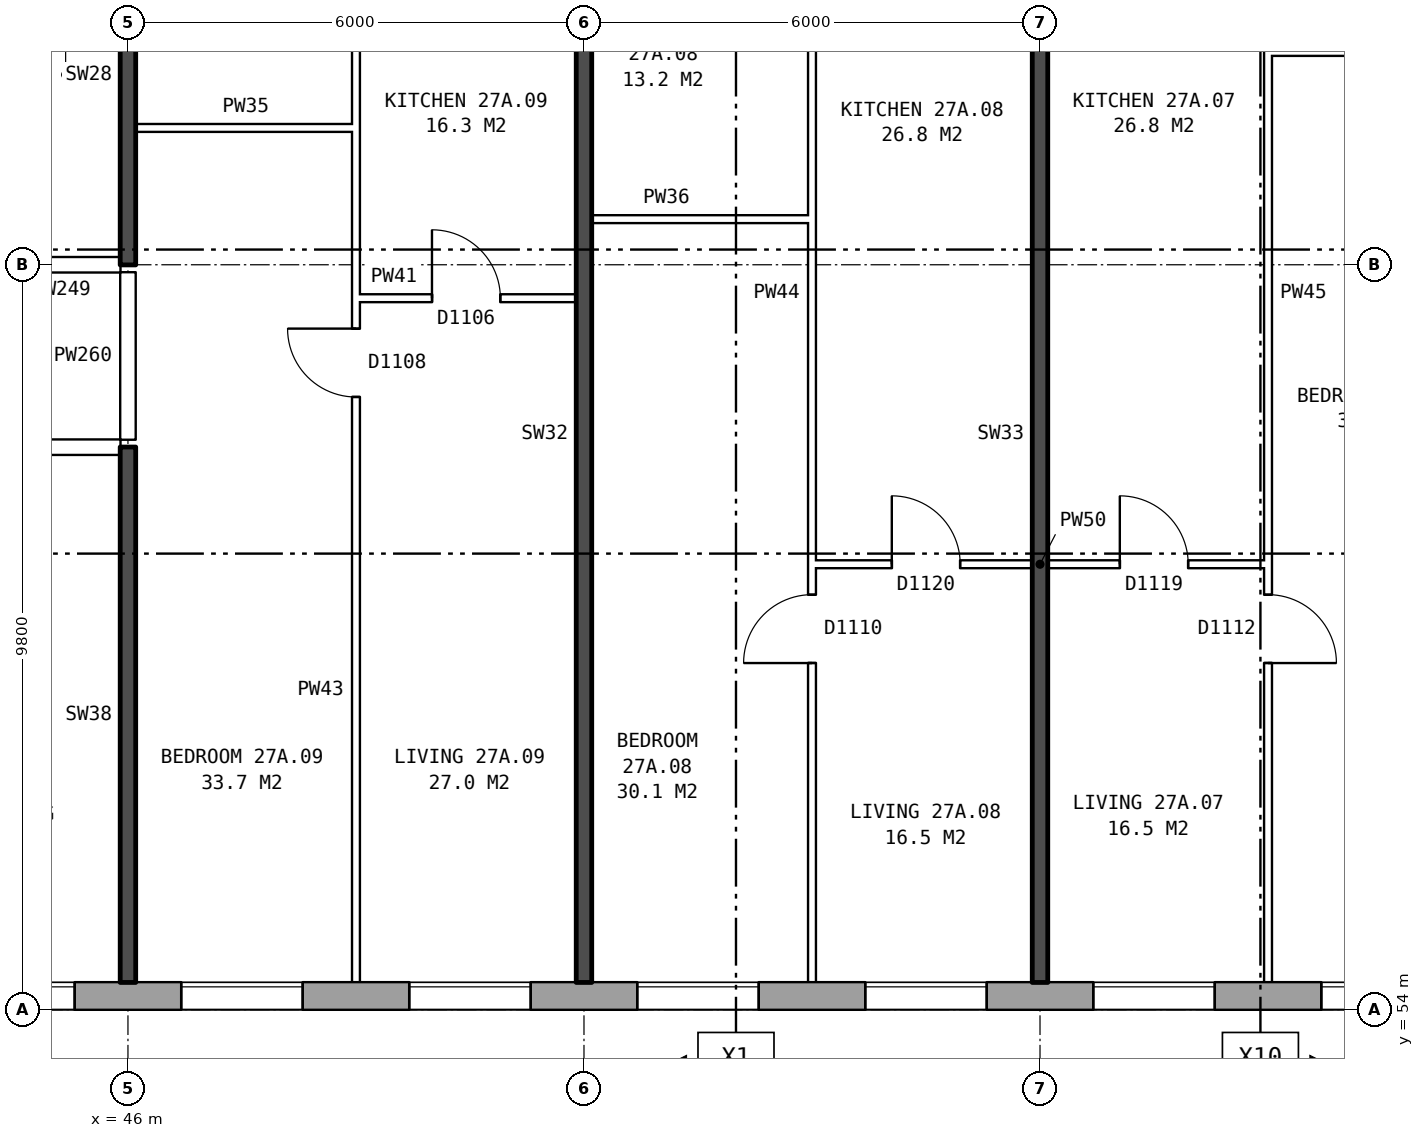
"""IFC4 building model, lengths in metres.
Left out: names, types, materials, properties, quantities, classifications, styles, units other than length and angle.
Written with IfcOpenShell. Run it as: python <this file> out.ifc"""

import sys

from ifc_helpers import new_model, si_unit, direction, frame, frame_2d, origin, place, context, subcontext, project, spatial, rectangle, extrude, element, fill, save


model = new_model("IFC4")
c1 = context("Model", 3, precision=1e-05, world=origin(), true_north=direction((0.0, 1.0)))
c2 = subcontext(c1, "Body", "Model", "MODEL_VIEW")
j1 = project(units=[si_unit("LENGTHUNIT", "METRE"), si_unit("PLANEANGLEUNIT", "RADIAN")], contexts=[c1])
p1 = place(None, origin())
s1 = spatial("IfcSite", under=j1, at=p1, CompositionType="ELEMENT")
p2 = place(p1, origin())
s2 = spatial("IfcBuilding", under=s1, at=p2, CompositionType="ELEMENT")
p3 = place(p2, frame((0.0, 0.0, 99.5)))
s3 = spatial("IfcBuildingStorey", under=s2, at=p3, CompositionType="ELEMENT", Elevation=99.5)
p4 = place(p3, frame((28.075, 54.18, 0.0), z_axis=(0.0, 0.0, 1.0), x_axis=(1.0, 0.0, 0.0)))
e1 = element("IfcWall", 1, at=p4, inside=s3, PredefinedType="STANDARD", context=c2, shape_type="SweptSolid", body=[
    extrude(rectangle(XDim=44.851, YDim=0.36, at=frame_2d((22.425, 0.0))), origin(), (0.0, 0.0, 1.0), 2.85),
])
p5 = place(p4, frame((0.625, 0.0, 0.8)))
e2 = element("IfcOpeningElement", 2, at=p5, cuts=e1, PredefinedType="OPENING", context=c2, shape_type="SweptSolid", body=[
    extrude(rectangle(XDim=1.6, YDim=1.8, at=frame_2d((0.8, 0.9))), frame((0.0, 0.19, 0.0), z_axis=(0.0, -1.0, 0.0), x_axis=(1.0, 0.0, 0.0)), (0.0, 0.0, 1.0), 0.38),
])
p6 = place(p4, frame((2.55, 0.0, 1.7)))
e3 = element("IfcOpeningElement", 3, at=p6, cuts=e1, PredefinedType="OPENING", context=c2, shape_type="SweptSolid", body=[
    extrude(rectangle(XDim=0.8, YDim=0.9, at=frame_2d((0.4, 0.45))), frame((0.0, 0.19, 0.0), z_axis=(0.0, -1.0, 0.0), x_axis=(1.0, 0.0, 0.0)), (0.0, 0.0, 1.0), 0.38),
])
p7 = place(p4, frame((6.625, 0.0, 0.8)))
e4 = element("IfcOpeningElement", 4, at=p7, cuts=e1, PredefinedType="OPENING", context=c2, shape_type="SweptSolid", body=[
    extrude(rectangle(XDim=1.6, YDim=1.8, at=frame_2d((0.8, 0.9))), frame((0.0, 0.19, 0.0), z_axis=(0.0, -1.0, 0.0), x_axis=(1.0, 0.0, 0.0)), (0.0, 0.0, 1.0), 0.38),
])
p8 = place(p4, frame((9.625, 0.0, 0.8)))
e5 = element("IfcOpeningElement", 5, at=p8, cuts=e1, PredefinedType="OPENING", context=c2, shape_type="SweptSolid", body=[
    extrude(rectangle(XDim=1.6, YDim=1.8, at=frame_2d((0.8, 0.9))), frame((0.0, 0.19, 0.0), z_axis=(0.0, -1.0, 0.0), x_axis=(1.0, 0.0, 0.0)), (0.0, 0.0, 1.0), 0.38),
])
p9 = place(p4, frame((12.625, 0.0, 0.8)))
e6 = element("IfcOpeningElement", 6, at=p9, cuts=e1, PredefinedType="OPENING", context=c2, shape_type="SweptSolid", body=[
    extrude(rectangle(XDim=1.6, YDim=1.8, at=frame_2d((0.8, 0.9))), frame((0.0, 0.19, 0.0), z_axis=(0.0, -1.0, 0.0), x_axis=(1.0, 0.0, 0.0)), (0.0, 0.0, 1.0), 0.38),
])
p10 = place(p4, frame((15.625, 0.0, 0.8)))
e7 = element("IfcOpeningElement", 7, at=p10, cuts=e1, PredefinedType="OPENING", context=c2, shape_type="SweptSolid", body=[
    extrude(rectangle(XDim=1.6, YDim=1.8, at=frame_2d((0.8, 0.9))), frame((0.0, 0.19, 0.0), z_axis=(0.0, -1.0, 0.0), x_axis=(1.0, 0.0, 0.0)), (0.0, 0.0, 1.0), 0.38),
])
p11 = place(p4, frame((18.625, 0.0, 0.8)))
e8 = element("IfcOpeningElement", 8, at=p11, cuts=e1, PredefinedType="OPENING", context=c2, shape_type="SweptSolid", body=[
    extrude(rectangle(XDim=1.6, YDim=1.8, at=frame_2d((0.8, 0.9))), frame((0.0, 0.19, 0.0), z_axis=(0.0, -1.0, 0.0), x_axis=(1.0, 0.0, 0.0)), (0.0, 0.0, 1.0), 0.38),
])
p12 = place(p4, frame((21.625, 0.0, 0.8)))
e9 = element("IfcOpeningElement", 9, at=p12, cuts=e1, PredefinedType="OPENING", context=c2, shape_type="SweptSolid", body=[
    extrude(rectangle(XDim=1.6, YDim=1.8, at=frame_2d((0.8, 0.9))), frame((0.0, 0.19, 0.0), z_axis=(0.0, -1.0, 0.0), x_axis=(1.0, 0.0, 0.0)), (0.0, 0.0, 1.0), 0.38),
])
p13 = place(p4, frame((24.625, 0.0, 0.8)))
e10 = element("IfcOpeningElement", 10, at=p13, cuts=e1, PredefinedType="OPENING", context=c2, shape_type="SweptSolid", body=[
    extrude(rectangle(XDim=1.6, YDim=1.8, at=frame_2d((0.8, 0.9))), frame((0.0, 0.19, 0.0), z_axis=(0.0, -1.0, 0.0), x_axis=(1.0, 0.0, 0.0)), (0.0, 0.0, 1.0), 0.38),
])
p14 = place(p4, frame((27.625, 0.0, 0.8)))
e11 = element("IfcOpeningElement", 11, at=p14, cuts=e1, PredefinedType="OPENING", context=c2, shape_type="SweptSolid", body=[
    extrude(rectangle(XDim=1.6, YDim=1.8, at=frame_2d((0.8, 0.9))), frame((0.0, 0.19, 0.0), z_axis=(0.0, -1.0, 0.0), x_axis=(1.0, 0.0, 0.0)), (0.0, 0.0, 1.0), 0.38),
])
p15 = place(p4, frame((30.625, 0.0, 0.8)))
e12 = element("IfcOpeningElement", 12, at=p15, cuts=e1, PredefinedType="OPENING", context=c2, shape_type="SweptSolid", body=[
    extrude(rectangle(XDim=1.6, YDim=1.8, at=frame_2d((0.8, 0.9))), frame((0.0, 0.19, 0.0), z_axis=(0.0, -1.0, 0.0), x_axis=(1.0, 0.0, 0.0)), (0.0, 0.0, 1.0), 0.38),
])
p16 = place(p4, frame((33.625, 0.0, 0.8)))
e13 = element("IfcOpeningElement", 13, at=p16, cuts=e1, PredefinedType="OPENING", context=c2, shape_type="SweptSolid", body=[
    extrude(rectangle(XDim=1.6, YDim=1.8, at=frame_2d((0.8, 0.9))), frame((0.0, 0.19, 0.0), z_axis=(0.0, -1.0, 0.0), x_axis=(1.0, 0.0, 0.0)), (0.0, 0.0, 1.0), 0.38),
])
p17 = place(p4, frame((36.625, 0.0, 0.8)))
e14 = element("IfcOpeningElement", 14, at=p17, cuts=e1, PredefinedType="OPENING", context=c2, shape_type="SweptSolid", body=[
    extrude(rectangle(XDim=1.6, YDim=1.8, at=frame_2d((0.8, 0.9))), frame((0.0, 0.19, 0.0), z_axis=(0.0, -1.0, 0.0), x_axis=(1.0, 0.0, 0.0)), (0.0, 0.0, 1.0), 0.38),
])
p18 = place(p4, frame((38.525, 0.0, 0.8)))
e15 = element("IfcOpeningElement", 15, at=p18, cuts=e1, PredefinedType="OPENING", context=c2, shape_type="SweptSolid", body=[
    extrude(rectangle(XDim=1.2, YDim=1.2, at=frame_2d((0.6, 0.6))), frame((0.0, 0.19, 0.0), z_axis=(0.0, -1.0, 0.0), x_axis=(1.0, 0.0, 0.0)), (0.0, 0.0, 1.0), 0.38),
])
p19 = place(p4, frame((42.625, 0.0, 0.8)))
e16 = element("IfcOpeningElement", 16, at=p19, cuts=e1, PredefinedType="OPENING", context=c2, shape_type="SweptSolid", body=[
    extrude(rectangle(XDim=1.6, YDim=1.8, at=frame_2d((0.8, 0.9))), frame((0.0, 0.19, 0.0), z_axis=(0.0, -1.0, 0.0), x_axis=(1.0, 0.0, 0.0)), (0.0, 0.0, 1.0), 0.38),
])
p20 = place(p4, frame((4.65, 0.0, 0.8)))
e17 = element("IfcOpeningElement", 17, at=p20, cuts=e1, PredefinedType="OPENING", context=c2, shape_type="SweptSolid", body=[
    extrude(rectangle(XDim=1.0, YDim=0.9, at=frame_2d((0.5, 0.45))), frame((0.0, 0.19, 0.0), z_axis=(0.0, -1.0, 0.0), x_axis=(1.0, 0.0, 0.0)), (0.0, 0.0, 1.0), 0.38),
])
p21 = place(p3, frame((55.0, 59.86, 0.0), z_axis=(0.0, 0.0, 1.0), x_axis=(1.0, 0.0, 0.0)))
e18 = element("IfcWall", 18, at=p21, inside=s3, PredefinedType="PARTITIONING", context=c2, shape_type="SweptSolid", body=[
    extrude(rectangle(XDim=6.0, YDim=0.1, at=frame_2d((3.0, 0.0))), origin(), (0.0, 0.0, 1.0), 2.85),
])
p22 = place(p21, frame((4.05, 0.0, 0.0)))
e19 = element("IfcOpeningElement", 19, at=p22, cuts=e18, PredefinedType="OPENING", context=c2, shape_type="SweptSolid", body=[
    extrude(rectangle(XDim=0.9, YDim=2.1, at=frame_2d((0.45, 1.05))), frame((0.0, 0.06, 0.0), z_axis=(0.0, -1.0, 0.0), x_axis=(1.0, 0.0, 0.0)), (0.0, 0.0, 1.0), 0.12),
])
p23 = place(p21, frame((1.05, 0.0, 0.0)))
e20 = element("IfcOpeningElement", 20, at=p23, cuts=e18, PredefinedType="OPENING", context=c2, shape_type="SweptSolid", body=[
    extrude(rectangle(XDim=0.9, YDim=2.1, at=frame_2d((0.45, 1.05))), frame((0.0, 0.06, 0.0), z_axis=(0.0, -1.0, 0.0), x_axis=(1.0, 0.0, 0.0)), (0.0, 0.0, 1.0), 0.12),
])
p24 = place(p3, frame((25.36, 61.4, 0.0), z_axis=(0.0, 0.0, 1.0), x_axis=(1.0, 0.0, 0.0)))
e21 = element("IfcWall", 21, at=p24, inside=s3, PredefinedType="PARTITIONING", context=c2, shape_type="SweptSolid", body=[
    extrude(rectangle(XDim=20.54, YDim=0.2, at=frame_2d((10.27, 0.0))), origin(), (0.0, 0.0, 1.0), 2.85),
])
p25 = place(p24, frame((18.09, 0.0, 0.0)))
e22 = element("IfcOpeningElement", 22, at=p25, cuts=e21, PredefinedType="OPENING", context=c2, shape_type="SweptSolid", body=[
    extrude(rectangle(XDim=1.0, YDim=2.1, at=frame_2d((0.5, 1.05))), frame((0.0, 0.11, 0.0), z_axis=(0.0, -1.0, 0.0), x_axis=(1.0, 0.0, 0.0)), (0.0, 0.0, 1.0), 0.22),
])
p26 = place(p24, frame((12.14, 0.0, 0.0)))
e23 = element("IfcOpeningElement", 23, at=p26, cuts=e21, PredefinedType="OPENING", context=c2, shape_type="SweptSolid", body=[
    extrude(rectangle(XDim=1.0, YDim=2.1, at=frame_2d((0.5, 1.05))), frame((0.0, 0.11, 0.0), z_axis=(0.0, -1.0, 0.0), x_axis=(1.0, 0.0, 0.0)), (0.0, 0.0, 1.0), 0.22),
])
p27 = place(p24, frame((2.62, 0.0, 0.0)))
e24 = element("IfcOpeningElement", 24, at=p27, cuts=e21, PredefinedType="OPENING", context=c2, shape_type="SweptSolid", body=[
    extrude(rectangle(XDim=1.0, YDim=2.1, at=frame_2d((0.5, 1.05))), frame((0.0, 0.11, 0.0), z_axis=(0.0, -1.0, 0.0), x_axis=(1.0, 0.0, 0.0)), (0.0, 0.0, 1.0), 0.22),
])
p28 = place(p3, frame((49.0, 63.36, 0.0), z_axis=(0.0, 0.0, 1.0), x_axis=(1.0, 0.0, 0.0)))
e25 = element("IfcWall", 25, at=p28, inside=s3, PredefinedType="PARTITIONING", context=c2, shape_type="SweptSolid", body=[
    extrude(rectangle(XDim=2.9, YDim=0.1, at=frame_2d((1.45, 0.0))), origin(), (0.0, 0.0, 1.0), 2.85),
])
p29 = place(p28, frame((1.0, 0.0, 0.0)))
e26 = element("IfcOpeningElement", 26, at=p29, cuts=e25, PredefinedType="OPENING", context=c2, shape_type="SweptSolid", body=[
    extrude(rectangle(XDim=0.9, YDim=2.1, at=frame_2d((0.45, 1.05))), frame((0.0, 0.06, 0.0), z_axis=(0.0, -1.0, 0.0), x_axis=(1.0, 0.0, 0.0)), (0.0, 0.0, 1.0), 0.12),
])
p30 = place(p3, frame((44.36, 63.8, 0.0), z_axis=(0.0, 0.0, 1.0), x_axis=(1.0, 0.0, 0.0)))
e27 = element("IfcWall", 27, at=p30, inside=s3, PredefinedType="PARTITIONING", context=c2, shape_type="SweptSolid", body=[
    extrude(rectangle(XDim=1.54, YDim=0.2, at=frame_2d((0.77, 0.0))), origin(), (0.0, 0.0, 1.0), 2.85),
])
for number, where, z_axis, x_axis in (
    (28, (52.1, 64.4, 0.0), (0.0, 0.0, 1.0), (1.0, 0.0, 0.0)),
    (29, (46.1, 65.6, 0.0), (0.0, 0.0, 1.0), (1.0, 0.0, 0.0)),
):
    element("IfcWall", number, at=place(p3, frame(where, z_axis=z_axis, x_axis=x_axis)), inside=s3, PredefinedType="PARTITIONING", context=c2, shape_type="SweptSolid", body=[
        extrude(rectangle(XDim=2.9, YDim=0.1, at=frame_2d((1.45, 0.0))), origin(), (0.0, 0.0, 1.0), 2.85),
    ])
p31 = place(p3, frame((61.0, 66.6, 0.0), z_axis=(0.0, 0.0, 1.0), x_axis=(1.0, 0.0, 0.0)))
e30 = element("IfcWall", 30, at=p31, inside=s3, PredefinedType="PARTITIONING", context=c2, shape_type="SweptSolid", body=[
    extrude(rectangle(XDim=2.64, YDim=0.1, at=frame_2d((1.32, 0.0))), origin(), (0.0, 0.0, 1.0), 2.85),
])
p32 = place(p3, frame((46.0, 54.36, 0.0), z_axis=(0.0, 0.0, 1.0), x_axis=(0.0, 1.0, 0.0)))
e31 = element("IfcWall", 31, at=p32, inside=s3, PredefinedType="SOLIDWALL", context=c2, shape_type="SweptSolid", body=[
    extrude(rectangle(XDim=7.04, YDim=0.2, at=frame_2d((3.52, 0.0))), origin(), (0.0, 0.0, 1.0), 2.85),
])
p33 = place(p3, frame((46.0, 61.5, 0.0), z_axis=(0.0, 0.0, 1.0), x_axis=(0.0, 1.0, 0.0)))
e32 = element("IfcWall", 32, at=p33, inside=s3, PredefinedType="PARTITIONING", context=c2, shape_type="SweptSolid", body=[
    extrude(rectangle(XDim=2.2, YDim=0.2, at=frame_2d((1.1, 0.0))), origin(), (0.0, 0.0, 1.0), 2.85),
])
p34 = place(p3, frame((46.0, 63.8, 0.0), z_axis=(0.0, 0.0, 1.0), x_axis=(0.0, 1.0, 0.0)))
e33 = element("IfcWall", 33, at=p34, inside=s3, PredefinedType="SOLIDWALL", context=c2, shape_type="SweptSolid", body=[
    extrude(rectangle(XDim=5.0, YDim=0.2, at=frame_2d((2.5, 0.0))), origin(), (0.0, 0.0, 1.0), 2.85),
])
p35 = place(p3, frame((49.0, 54.36, 0.0), z_axis=(0.0, 0.0, 1.0), x_axis=(0.0, 1.0, 0.0)))
e34 = element("IfcWall", 34, at=p35, inside=s3, PredefinedType="PARTITIONING", context=c2, shape_type="SweptSolid", body=[
    extrude(rectangle(XDim=14.34, YDim=0.1, at=frame_2d((7.17, 0.0))), origin(), (0.0, 0.0, 1.0), 2.85),
])
p36 = place(p35, frame((7.7, 0.0, 0.0)))
e35 = element("IfcOpeningElement", 35, at=p36, cuts=e34, PredefinedType="OPENING", context=c2, shape_type="SweptSolid", body=[
    extrude(rectangle(XDim=0.9, YDim=2.1, at=frame_2d((0.45, 1.05))), frame((0.0, 0.06, 0.0), z_axis=(0.0, -1.0, 0.0), x_axis=(1.0, 0.0, 0.0)), (0.0, 0.0, 1.0), 0.12),
])
p37 = place(p35, frame((13.04, 0.0, 0.0)))
e36 = element("IfcOpeningElement", 36, at=p37, cuts=e34, PredefinedType="OPENING", context=c2, shape_type="SweptSolid", body=[
    extrude(rectangle(XDim=0.9, YDim=2.1, at=frame_2d((0.45, 1.05))), frame((0.0, 0.06, 0.0), z_axis=(0.0, -1.0, 0.0), x_axis=(1.0, 0.0, 0.0)), (0.0, 0.0, 1.0), 0.12),
])
p38 = place(p3, frame((52.0, 54.36, 0.0), z_axis=(0.0, 0.0, 1.0), x_axis=(0.0, 1.0, 0.0)))
e37 = element("IfcWall", 37, at=p38, inside=s3, PredefinedType="SOLIDWALL", context=c2, shape_type="SweptSolid", body=[
    extrude(rectangle(XDim=14.44, YDim=0.2, at=frame_2d((7.22, 0.0))), origin(), (0.0, 0.0, 1.0), 2.85),
])
p39 = place(p3, frame((55.0, 54.36, 0.0), z_axis=(0.0, 0.0, 1.0), x_axis=(0.0, 1.0, 0.0)))
e38 = element("IfcWall", 38, at=p39, inside=s3, PredefinedType="PARTITIONING", context=c2, shape_type="SweptSolid", body=[
    extrude(rectangle(XDim=14.34, YDim=0.1, at=frame_2d((7.17, 0.0))), origin(), (0.0, 0.0, 1.0), 2.85),
])
p40 = place(p39, frame((4.2, 0.0, 0.0)))
e39 = element("IfcOpeningElement", 39, at=p40, cuts=e38, PredefinedType="OPENING", context=c2, shape_type="SweptSolid", body=[
    extrude(rectangle(XDim=0.9, YDim=2.1, at=frame_2d((0.45, 1.05))), frame((0.0, 0.06, 0.0), z_axis=(0.0, -1.0, 0.0), x_axis=(1.0, 0.0, 0.0)), (0.0, 0.0, 1.0), 0.12),
])
p41 = place(p39, frame((13.04, 0.0, 0.0)))
e40 = element("IfcOpeningElement", 40, at=p41, cuts=e38, PredefinedType="OPENING", context=c2, shape_type="SweptSolid", body=[
    extrude(rectangle(XDim=0.9, YDim=2.1, at=frame_2d((0.45, 1.05))), frame((0.0, 0.06, 0.0), z_axis=(0.0, -1.0, 0.0), x_axis=(1.0, 0.0, 0.0)), (0.0, 0.0, 1.0), 0.12),
])
p42 = place(p3, frame((58.0, 54.36, 0.0), z_axis=(0.0, 0.0, 1.0), x_axis=(0.0, 1.0, 0.0)))
e41 = element("IfcWall", 41, at=p42, inside=s3, PredefinedType="SOLIDWALL", context=c2, shape_type="SweptSolid", body=[
    extrude(rectangle(XDim=14.44, YDim=0.2, at=frame_2d((7.22, 0.0))), origin(), (0.0, 0.0, 1.0), 2.85),
])
p43 = place(p3, frame((61.0, 54.36, 0.0), z_axis=(0.0, 0.0, 1.0), x_axis=(0.0, 1.0, 0.0)))
e42 = element("IfcWall", 42, at=p43, inside=s3, PredefinedType="PARTITIONING", context=c2, shape_type="SweptSolid", body=[
    extrude(rectangle(XDim=14.34, YDim=0.1, at=frame_2d((7.17, 0.0))), origin(), (0.0, 0.0, 1.0), 2.85),
])
p44 = place(p43, frame((4.2, 0.0, 0.0)))
e43 = element("IfcOpeningElement", 43, at=p44, cuts=e42, PredefinedType="OPENING", context=c2, shape_type="SweptSolid", body=[
    extrude(rectangle(XDim=0.9, YDim=2.1, at=frame_2d((0.45, 1.05))), frame((0.0, 0.06, 0.0), z_axis=(0.0, -1.0, 0.0), x_axis=(1.0, 0.0, 0.0)), (0.0, 0.0, 1.0), 0.12),
])
p45 = place(p43, frame((13.04, 0.0, 0.0)))
e44 = element("IfcOpeningElement", 44, at=p45, cuts=e42, PredefinedType="OPENING", context=c2, shape_type="SweptSolid", body=[
    extrude(rectangle(XDim=0.9, YDim=2.1, at=frame_2d((0.45, 1.05))), frame((0.0, 0.06, 0.0), z_axis=(0.0, -1.0, 0.0), x_axis=(1.0, 0.0, 0.0)), (0.0, 0.0, 1.0), 0.12),
])
p46 = place(p10, origin())
e45 = element("IfcWindow", 45, at=p46, inside=s3, PartitioningType="SINGLE_PANEL", PredefinedType="WINDOW", context=c2, shape_type="SweptSolid", body=[
    extrude(rectangle(XDim=1.6, YDim=1.8, at=frame_2d((0.8, 0.9))), frame((0.0, 0.15, 0.0), z_axis=(0.0, -1.0, 0.0), x_axis=(1.0, 0.0, 0.0)), (0.0, 0.0, 1.0), 0.06),
])
fill(e7, e45)
p47 = place(p11, origin())
e46 = element("IfcWindow", 46, at=p47, inside=s3, PartitioningType="SINGLE_PANEL", PredefinedType="WINDOW", context=c2, shape_type="SweptSolid", body=[
    extrude(rectangle(XDim=1.6, YDim=1.8, at=frame_2d((0.8, 0.9))), frame((0.0, 0.15, 0.0), z_axis=(0.0, -1.0, 0.0), x_axis=(1.0, 0.0, 0.0)), (0.0, 0.0, 1.0), 0.06),
])
fill(e8, e46)
p48 = place(p12, origin())
e47 = element("IfcWindow", 47, at=p48, inside=s3, PartitioningType="SINGLE_PANEL", PredefinedType="WINDOW", context=c2, shape_type="SweptSolid", body=[
    extrude(rectangle(XDim=1.6, YDim=1.8, at=frame_2d((0.8, 0.9))), frame((0.0, 0.15, 0.0), z_axis=(0.0, -1.0, 0.0), x_axis=(1.0, 0.0, 0.0)), (0.0, 0.0, 1.0), 0.06),
])
fill(e9, e47)
p49 = place(p13, origin())
e48 = element("IfcWindow", 48, at=p49, inside=s3, PartitioningType="SINGLE_PANEL", PredefinedType="WINDOW", context=c2, shape_type="SweptSolid", body=[
    extrude(rectangle(XDim=1.6, YDim=1.8, at=frame_2d((0.8, 0.9))), frame((0.0, 0.15, 0.0), z_axis=(0.0, -1.0, 0.0), x_axis=(1.0, 0.0, 0.0)), (0.0, 0.0, 1.0), 0.06),
])
fill(e10, e48)
p50 = place(p14, origin())
e49 = element("IfcWindow", 49, at=p50, inside=s3, PartitioningType="SINGLE_PANEL", PredefinedType="WINDOW", context=c2, shape_type="SweptSolid", body=[
    extrude(rectangle(XDim=1.6, YDim=1.8, at=frame_2d((0.8, 0.9))), frame((0.0, 0.15, 0.0), z_axis=(0.0, -1.0, 0.0), x_axis=(1.0, 0.0, 0.0)), (0.0, 0.0, 1.0), 0.06),
])
fill(e11, e49)
p51 = place(p15, origin())
e50 = element("IfcWindow", 50, at=p51, inside=s3, PartitioningType="SINGLE_PANEL", PredefinedType="WINDOW", context=c2, shape_type="SweptSolid", body=[
    extrude(rectangle(XDim=1.6, YDim=1.8, at=frame_2d((0.8, 0.9))), frame((0.0, 0.15, 0.0), z_axis=(0.0, -1.0, 0.0), x_axis=(1.0, 0.0, 0.0)), (0.0, 0.0, 1.0), 0.06),
])
fill(e12, e50)
p52 = place(p16, origin())
e51 = element("IfcWindow", 51, at=p52, inside=s3, PartitioningType="SINGLE_PANEL", PredefinedType="WINDOW", context=c2, shape_type="SweptSolid", body=[
    extrude(rectangle(XDim=1.6, YDim=1.8, at=frame_2d((0.8, 0.9))), frame((0.0, 0.15, 0.0), z_axis=(0.0, -1.0, 0.0), x_axis=(1.0, 0.0, 0.0)), (0.0, 0.0, 1.0), 0.06),
])
fill(e13, e51)
p53 = place(p44, frame((0.9, 0.0, 0.0), z_axis=(0.0, 0.0, 1.0), x_axis=(-1.0, 0.0, 0.0)))
e52 = element("IfcDoor", 52, at=p53, inside=s3, OperationType="SINGLE_SWING_RIGHT", PredefinedType="DOOR", context=c2, shape_type="SweptSolid", body=[
    extrude(rectangle(XDim=0.9, YDim=2.1, at=frame_2d((0.45, 1.05))), frame((0.0, 0.025, 0.0), z_axis=(0.0, -1.0, 0.0), x_axis=(1.0, 0.0, 0.0)), (0.0, 0.0, 1.0), 0.05),
])
fill(e43, e52)
p54 = place(p22, origin())
e53 = element("IfcDoor", 53, at=p54, inside=s3, OperationType="SINGLE_SWING_LEFT", PredefinedType="DOOR", context=c2, shape_type="SweptSolid", body=[
    extrude(rectangle(XDim=0.9, YDim=2.1, at=frame_2d((0.45, 1.05))), frame((0.0, 0.025, 0.0), z_axis=(0.0, -1.0, 0.0), x_axis=(1.0, 0.0, 0.0)), (0.0, 0.0, 1.0), 0.05),
])
fill(e19, e53)
p55 = place(p40, origin())
e54 = element("IfcDoor", 54, at=p55, inside=s3, OperationType="SINGLE_SWING_LEFT", PredefinedType="DOOR", context=c2, shape_type="SweptSolid", body=[
    extrude(rectangle(XDim=0.9, YDim=2.1, at=frame_2d((0.45, 1.05))), frame((0.0, 0.025, 0.0), z_axis=(0.0, -1.0, 0.0), x_axis=(1.0, 0.0, 0.0)), (0.0, 0.0, 1.0), 0.05),
])
fill(e39, e54)
p56 = place(p23, origin())
e55 = element("IfcDoor", 55, at=p56, inside=s3, OperationType="SINGLE_SWING_LEFT", PredefinedType="DOOR", context=c2, shape_type="SweptSolid", body=[
    extrude(rectangle(XDim=0.9, YDim=2.1, at=frame_2d((0.45, 1.05))), frame((0.0, 0.025, 0.0), z_axis=(0.0, -1.0, 0.0), x_axis=(1.0, 0.0, 0.0)), (0.0, 0.0, 1.0), 0.05),
])
fill(e20, e55)
p57 = place(p36, origin())
e56 = element("IfcDoor", 56, at=p57, inside=s3, OperationType="SINGLE_SWING_RIGHT", PredefinedType="DOOR", context=c2, shape_type="SweptSolid", body=[
    extrude(rectangle(XDim=0.9, YDim=2.1, at=frame_2d((0.45, 1.05))), frame((0.0, 0.025, 0.0), z_axis=(0.0, -1.0, 0.0), x_axis=(1.0, 0.0, 0.0)), (0.0, 0.0, 1.0), 0.05),
])
fill(e35, e56)
p58 = place(p29, origin())
e57 = element("IfcDoor", 57, at=p58, inside=s3, OperationType="SINGLE_SWING_LEFT", PredefinedType="DOOR", context=c2, shape_type="SweptSolid", body=[
    extrude(rectangle(XDim=0.9, YDim=2.1, at=frame_2d((0.45, 1.05))), frame((0.0, 0.025, 0.0), z_axis=(0.0, -1.0, 0.0), x_axis=(1.0, 0.0, 0.0)), (0.0, 0.0, 1.0), 0.05),
])
fill(e26, e57)
save(model, sys.argv[1])
